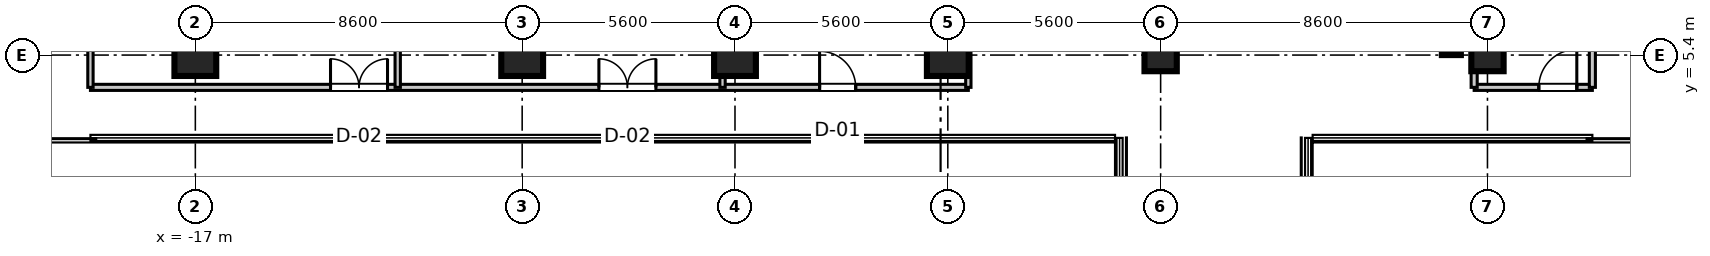
"""IFC4 building model, lengths in metres.
Left out: names, types, materials, properties, quantities, classifications, styles, units other than length and angle.
Written with IfcOpenShell. Run it as: python <this file> out.ifc"""

import sys

from ifc_helpers import new_model, si_unit, direction, frame, frame_2d, origin, origin_2d, place, context, subcontext, project, spatial, rectangle, extrude, source, transform, mapped, element, fill, save


model = new_model("IFC4")
c1 = context("Model", 3, precision=1e-05, world=origin(), true_north=direction((0.0, 1.0)))
c2 = subcontext(c1, "Body", "Model", "MODEL_VIEW")
j1 = project(units=[si_unit("LENGTHUNIT", "METRE"), si_unit("PLANEANGLEUNIT", "RADIAN")], contexts=[c1])
p1 = place(None, origin())
s1 = spatial("IfcSite", under=j1, at=p1, CompositionType="ELEMENT")
p2 = place(p1, origin())
s2 = spatial("IfcBuilding", under=s1, at=p2, CompositionType="ELEMENT")
p3 = place(p2, frame((0.0, 0.0, 178.2)))
s3 = spatial("IfcBuildingStorey", under=s2, at=p3, CompositionType="ELEMENT", Elevation=178.2)
m1 = source(origin(), c2, "Body", "SweptSolid", [
    extrude(rectangle(XDim=1.1, YDim=1.1, at=origin_2d()), origin(), (0.0, 0.0, 1.0), 3.605),
])
for number, where, z_axis, x_axis in (
    (1, (-17.0, 5.4, 0.0), (0.0, 0.0, 1.0), (1.0, 0.0, 0.0)),
    (2, (-8.4, 5.4, 0.0), (0.0, 0.0, 1.0), (1.0, 0.0, 0.0)),
    (3, (-2.8, 5.4, 0.0), (0.0, 0.0, 1.0), (1.0, 0.0, 0.0)),
    (4, (2.8, 5.4, 0.0), (0.0, 0.0, 1.0), (1.0, 0.0, 0.0)),
):
    element("IfcColumn", number, at=place(p3, frame(where, z_axis=z_axis, x_axis=x_axis)), inside=s3, PredefinedType="COLUMN", context=c2, shape_type="MappedRepresentation", body=[
        mapped(m1, transform((0.0, 0.0, 0.0), scale=1.0)),
    ])
m2 = source(origin(), c2, "Body", "SweptSolid", [
    extrude(rectangle(XDim=0.85, YDim=0.85, at=origin_2d()), origin(), (0.0, 0.0, 1.0), 3.605),
])
for number, where, z_axis, x_axis in (
    (5, (8.4, 5.4, 0.0), (0.0, 0.0, 1.0), (1.0, 0.0, 0.0)),
    (6, (17.0, 5.4, 0.0), (0.0, 0.0, 1.0), (1.0, 0.0, 0.0)),
):
    element("IfcColumn", number, at=place(p3, frame(where, z_axis=z_axis, x_axis=x_axis)), inside=s3, PredefinedType="PILASTER", context=c2, shape_type="MappedRepresentation", body=[
        mapped(m2, transform((0.0, 0.0, 0.0), scale=1.0)),
    ])
m3 = source(origin(), c2, "Body", "SweptSolid", [
    extrude(rectangle(XDim=11.6, YDim=0.5, at=frame_2d((5.8, 0.0))), origin(), (0.0, 0.0, 1.0), 3.39),
])
p4 = place(p3, frame((16.05, 5.4, 0.0), z_axis=(0.0, 0.0, 1.0), x_axis=(0.0, 1.0, 0.0)))
e7 = element("IfcWall", 7, at=p4, inside=s3, PredefinedType="SHEAR", context=c2, shape_type="MappedRepresentation", body=[
    mapped(m3, transform((0.0, 0.0, 0.0), scale=1.0)),
])
m4 = source(origin(), c2, "Body", "SweptSolid", [
    extrude(rectangle(XDim=3.11, YDim=0.16, at=frame_2d((1.555, 0.0))), origin(), (0.0, 0.0, 1.0), 2.73),
])
p5 = place(p3, frame((16.65, 4.55, 0.0), z_axis=(0.0, 0.0, 1.0), x_axis=(1.0, 0.0, 0.0)))
e8 = element("IfcWall", 8, at=p5, inside=s3, PredefinedType="PARTITIONING", context=c2, shape_type="MappedRepresentation", body=[
    mapped(m4, transform((0.0, 0.0, 0.0), scale=1.0)),
])
p6 = place(p5, frame((1.701, 0.0, 0.0)))
e9 = element("IfcOpeningElement", 9, at=p6, cuts=e8, PredefinedType="OPENING", context=c2, shape_type="SweptSolid", body=[
    extrude(rectangle(XDim=1.0, YDim=2.1, at=frame_2d((0.5, 1.05))), frame((0.0, 0.09, 0.0), z_axis=(0.0, -1.0, 0.0), x_axis=(1.0, 0.0, 0.0)), (0.0, 0.0, 1.0), 0.18),
])
m5 = source(origin(), c2, "Body", "SweptSolid", [
    extrude(rectangle(XDim=17.95, YDim=0.16, at=frame_2d((8.975, 0.0))), origin(), (0.0, 0.0, 1.0), 2.73),
])
p7 = place(p3, frame((16.65, 4.55, 0.0), z_axis=(0.0, 0.0, 1.0), x_axis=(0.0, 1.0, 0.0)))
e10 = element("IfcWall", 10, at=p7, inside=s3, PredefinedType="PARTITIONING", context=c2, shape_type="MappedRepresentation", body=[
    mapped(m5, transform((0.0, 0.0, 0.0), scale=1.0)),
])
m6 = source(origin(), c2, "Body", "SweptSolid", [
    extrude(rectangle(XDim=16.53, YDim=0.16, at=frame_2d((8.265, 0.0))), origin(), (0.0, 0.0, 1.0), 2.73),
])
p8 = place(p3, frame((19.76, 4.55, 0.0), z_axis=(0.0, 0.0, 1.0), x_axis=(0.0, 1.0, 0.0)))
e11 = element("IfcWall", 11, at=p8, inside=s3, PredefinedType="PARTITIONING", context=c2, shape_type="MappedRepresentation", body=[
    mapped(m6, transform((0.0, 0.0, 0.0), scale=1.0)),
])
m7 = source(origin(), c2, "Body", "SweptSolid", [
    extrude(rectangle(XDim=23.1, YDim=0.16, at=frame_2d((11.55, 0.0))), origin(), (0.0, 0.0, 1.0), 2.73),
])
p9 = place(p3, frame((-19.76, 4.55, 0.0), z_axis=(0.0, 0.0, 1.0), x_axis=(1.0, 0.0, 0.0)))
e12 = element("IfcWall", 12, at=p9, inside=s3, PredefinedType="PARTITIONING", context=c2, shape_type="MappedRepresentation", body=[
    mapped(m7, transform((0.0, 0.0, 0.0), scale=1.0)),
])
p10 = place(p9, frame((6.317, 0.0, 0.0)))
e13 = element("IfcOpeningElement", 13, at=p10, cuts=e12, PredefinedType="OPENING", context=c2, shape_type="SweptSolid", body=[
    extrude(rectangle(XDim=1.5, YDim=2.15, at=frame_2d((0.75, 1.075))), frame((0.0, 0.09, 0.0), z_axis=(0.0, -1.0, 0.0), x_axis=(1.0, 0.0, 0.0)), (0.0, 0.0, 1.0), 0.18),
])
p11 = place(p9, frame((13.379, 0.0, 0.0)))
e14 = element("IfcOpeningElement", 14, at=p11, cuts=e12, PredefinedType="OPENING", context=c2, shape_type="SweptSolid", body=[
    extrude(rectangle(XDim=1.5, YDim=2.15, at=frame_2d((0.75, 1.075))), frame((0.0, 0.09, 0.0), z_axis=(0.0, -1.0, 0.0), x_axis=(1.0, 0.0, 0.0)), (0.0, 0.0, 1.0), 0.18),
])
p12 = place(p9, frame((19.186, 0.0, 0.0)))
e15 = element("IfcOpeningElement", 15, at=p12, cuts=e12, PredefinedType="OPENING", context=c2, shape_type="SweptSolid", body=[
    extrude(rectangle(XDim=0.95, YDim=2.1, at=frame_2d((0.475, 1.05))), frame((0.0, 0.09, 0.0), z_axis=(0.0, -1.0, 0.0), x_axis=(1.0, 0.0, 0.0)), (0.0, 0.0, 1.0), 0.18),
])
m8 = source(origin(), c2, "Body", "SweptSolid", [
    extrude(rectangle(XDim=16.53, YDim=0.14, at=frame_2d((8.265, 0.0))), origin(), (0.0, 0.0, 1.0), 2.73),
])
p13 = place(p3, frame((-19.76, 4.55, 0.0), z_axis=(0.0, 0.0, 1.0), x_axis=(0.0, 1.0, 0.0)))
e16 = element("IfcWall", 16, at=p13, inside=s3, PredefinedType="PARTITIONING", context=c2, shape_type="MappedRepresentation", body=[
    mapped(m8, transform((0.0, 0.0, 0.0), scale=1.0)),
])
m9 = source(origin(), c2, "Body", "SweptSolid", [
    extrude(rectangle(XDim=17.95, YDim=0.14, at=frame_2d((8.975, 0.0))), origin(), (0.0, 0.0, 1.0), 2.73),
])
for number, where, z_axis, x_axis in (
    (17, (3.34, 4.55, 0.0), (0.0, 0.0, 1.0), (0.0, 1.0, 0.0)),
    (18, (-11.675, 4.55, 0.0), (0.0, 0.0, 1.0), (0.0, 1.0, 0.0)),
    (19, (-3.128, 4.55, 0.0), (0.0, 0.0, 1.0), (0.0, 1.0, 0.0)),
):
    element("IfcWall", number, at=place(p3, frame(where, z_axis=z_axis, x_axis=x_axis)), inside=s3, PredefinedType="PARTITIONING", context=c2, shape_type="MappedRepresentation", body=[
        mapped(m9, transform((0.0, 0.0, 0.0), scale=1.0)),
    ])
m10 = source(origin(), c2, "Body", "SweptSolid", [
    extrude(rectangle(XDim=1.0, YDim=2.1, at=frame_2d((0.5, 1.05))), frame((0.0, 0.025, 0.0), z_axis=(0.0, -1.0, 0.0), x_axis=(1.0, 0.0, 0.0)), (0.0, 0.0, 1.0), 0.05),
])
p14 = place(p6, origin())
e20 = element("IfcDoor", 20, at=p14, inside=s3, OperationType="SINGLE_SWING_RIGHT", PredefinedType="DOOR", context=c2, shape_type="MappedRepresentation", body=[
    mapped(m10, transform((0.0, 0.0, 0.0), scale=1.0)),
])
fill(e9, e20)
m11 = source(origin(), c2, "Body", "SweptSolid", [
    extrude(rectangle(XDim=1.5, YDim=2.15, at=frame_2d((0.75, 1.075))), frame((0.0, 0.025, 0.0), z_axis=(0.0, -1.0, 0.0), x_axis=(1.0, 0.0, 0.0)), (0.0, 0.0, 1.0), 0.05),
])
p15 = place(p10, origin())
e21 = element("IfcDoor", 21, at=p15, inside=s3, OperationType="DOUBLE_DOOR_SINGLE_SWING", PredefinedType="DOOR", context=c2, shape_type="MappedRepresentation", body=[
    mapped(m11, transform((0.0, 0.0, 0.0), scale=1.0)),
])
fill(e13, e21)
p16 = place(p11, origin())
e22 = element("IfcDoor", 22, at=p16, inside=s3, OperationType="DOUBLE_DOOR_SINGLE_SWING", PredefinedType="DOOR", context=c2, shape_type="MappedRepresentation", body=[
    mapped(m11, transform((0.0, 0.0, 0.0), scale=1.0)),
])
fill(e14, e22)
m12 = source(origin(), c2, "Body", "SweptSolid", [
    extrude(rectangle(XDim=0.95, YDim=2.1, at=frame_2d((0.475, 1.05))), frame((0.0, 0.025, 0.0), z_axis=(0.0, -1.0, 0.0), x_axis=(1.0, 0.0, 0.0)), (0.0, 0.0, 1.0), 0.05),
])
p17 = place(p12, origin())
e23 = element("IfcDoor", 23, at=p17, inside=s3, OperationType="SINGLE_SWING_LEFT", PredefinedType="DOOR", context=c2, shape_type="MappedRepresentation", body=[
    mapped(m12, transform((0.0, 0.0, 0.0), scale=1.0)),
])
fill(e15, e23)
save(model, sys.argv[1])
